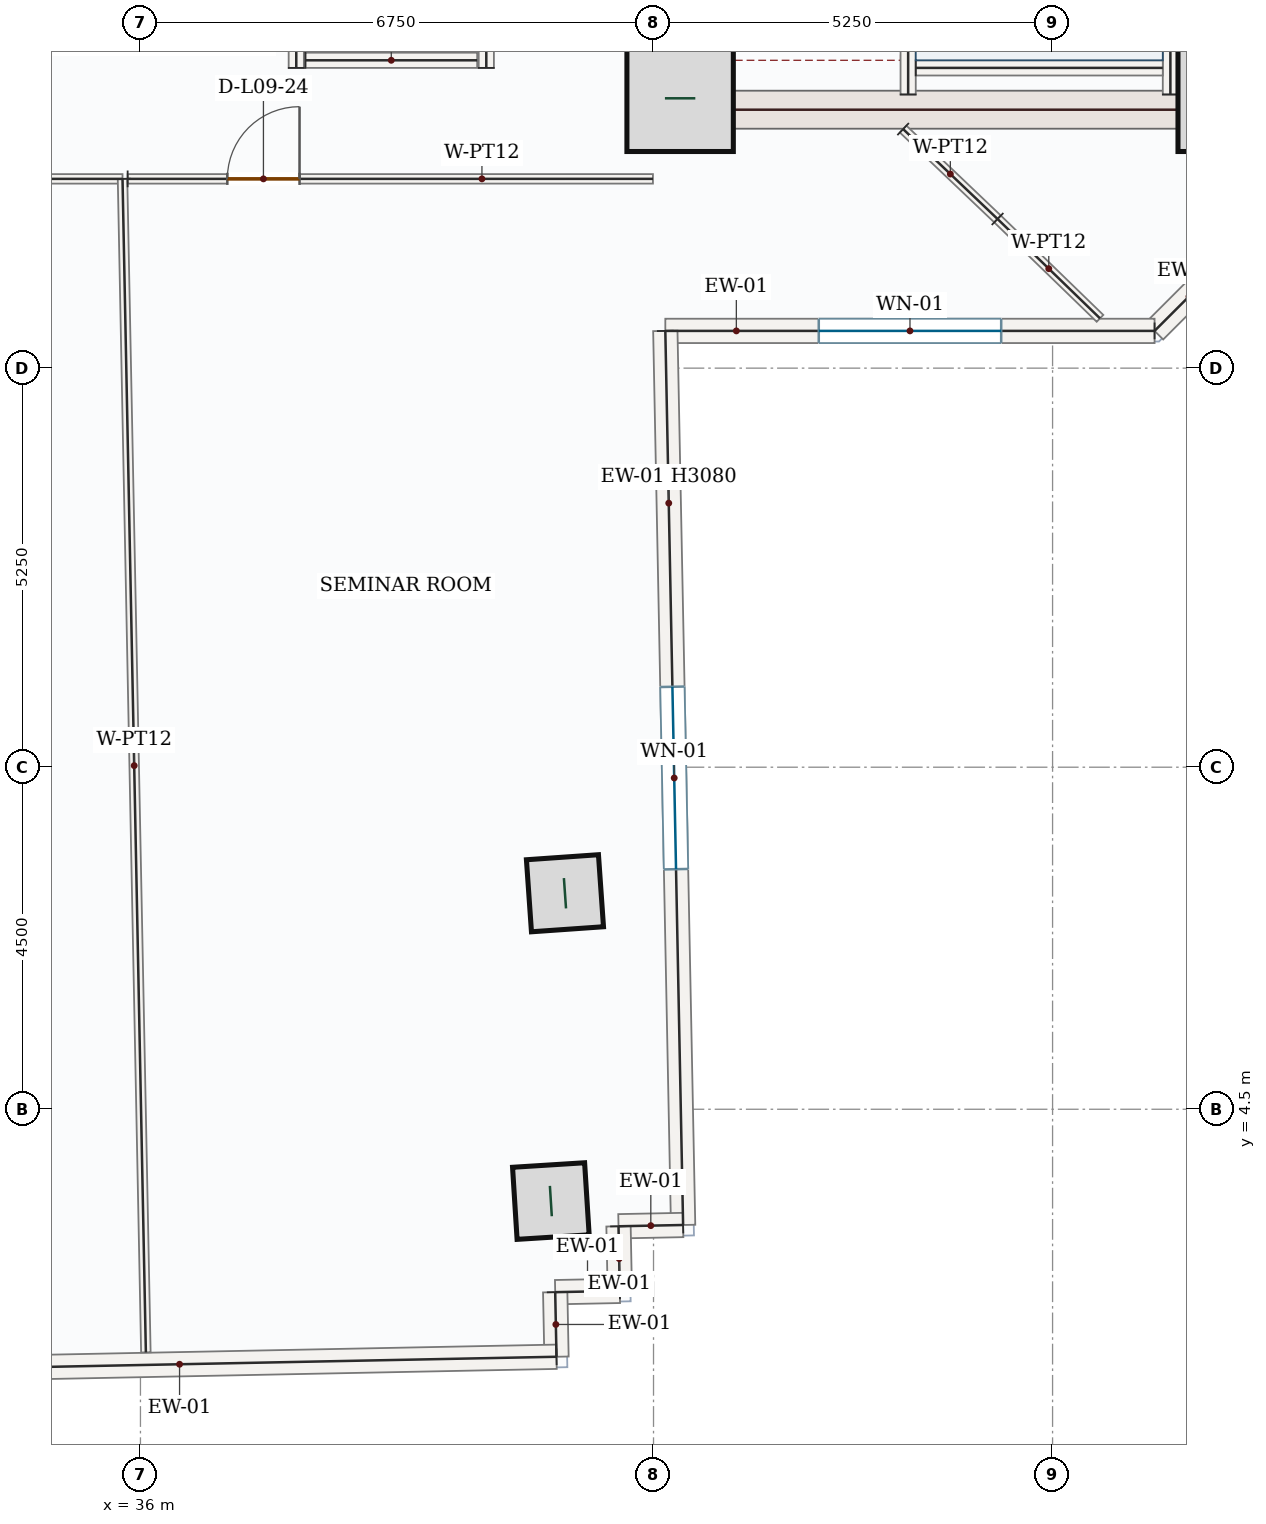
"""IFC4 building model, lengths in metres.
Left out: names, types, materials, properties, quantities, classifications, styles, units other than length and angle.
Written with IfcOpenShell. Run it as: python <this file> out.ifc"""

import sys

from ifc_helpers import new_model, si_unit, direction, frame, frame_2d, origin, origin_2d, place, context, subcontext, project, spatial, rectangle, hollow_rectangle, extrude, source, transform, mapped, element, fill, save


model = new_model("IFC4")
c1 = context("Model", 3, precision=1e-05, world=origin(), true_north=direction((0.0, 1.0)))
c2 = subcontext(c1, "Body", "Model", "MODEL_VIEW")
j1 = project(units=[si_unit("LENGTHUNIT", "METRE"), si_unit("PLANEANGLEUNIT", "RADIAN")], contexts=[c1])
p1 = place(None, origin())
s1 = spatial("IfcSite", under=j1, at=p1, CompositionType="ELEMENT")
p2 = place(p1, origin())
s2 = spatial("IfcBuilding", under=s1, at=p2, CompositionType="ELEMENT")
p3 = place(p2, frame((0.0, 0.0, 45.9)))
s3 = spatial("IfcBuildingStorey", under=s2, at=p3, CompositionType="ELEMENT", Elevation=45.9)
p4 = place(p3, frame((43.0, 17.4, 0.0), z_axis=(0.0, 0.0, 1.0), x_axis=(0.0, 1.0, 0.0)))
e1 = element("IfcWall", 1, at=p4, inside=s3, PredefinedType="SHEAR", context=c2, shape_type="SweptSolid", body=[
    extrude(rectangle(XDim=8.55, YDim=0.5, at=frame_2d((4.275, 0.0))), origin(), (0.0, 0.0, 1.0), 3.95),
])
p5 = place(p4, frame((6.65, 0.0, 0.0)))
e2 = element("IfcOpeningElement", 2, at=p5, cuts=e1, PredefinedType="OPENING", context=c2, shape_type="SweptSolid", body=[
    extrude(rectangle(XDim=1.1, YDim=2.2, at=frame_2d((0.55, 1.1))), frame((0.0, 0.26, 0.0), z_axis=(0.0, -1.0, 0.0), x_axis=(1.0, 0.0, 0.0)), (0.0, 0.0, 1.0), 0.52),
])
p6 = place(p4, frame((1.75, 0.0, 0.0)))
e3 = element("IfcOpeningElement", 3, at=p6, cuts=e1, PredefinedType="OPENING", context=c2, shape_type="SweptSolid", body=[
    extrude(rectangle(XDim=1.3, YDim=2.2, at=frame_2d((0.65, 1.1))), frame((0.0, 0.26, 0.0), z_axis=(0.0, -1.0, 0.0), x_axis=(1.0, 0.0, 0.0)), (0.0, 0.0, 1.0), 0.52),
])
p7 = place(p4, frame((4.55, 0.0, 0.0)))
e4 = element("IfcOpeningElement", 4, at=p7, cuts=e1, PredefinedType="OPENING", context=c2, shape_type="SweptSolid", body=[
    extrude(rectangle(XDim=0.88, YDim=2.1, at=frame_2d((0.44, 1.05))), frame((0.0, 0.26, 0.0), z_axis=(0.0, -1.0, 0.0), x_axis=(1.0, 0.0, 0.0)), (0.0, 0.0, 1.0), 0.52),
])
m1 = source(origin(), c2, "Body", "SweptSolid", [
    extrude(rectangle(XDim=7.0, YDim=0.5, at=frame_2d((3.5, 0.0))), origin(), (0.0, 0.0, 1.0), 3.95),
])
p8 = place(p3, frame((43.25, 17.65, 0.0), z_axis=(0.0, 0.0, 1.0), x_axis=(1.0, 0.0, 0.0)))
e5 = element("IfcWall", 5, at=p8, inside=s3, PredefinedType="SHEAR", context=c2, shape_type="MappedRepresentation", body=[
    mapped(m1, transform((0.0, 0.0, 0.0), x_axis=(1.0, 0.0, 0.0), y_axis=(0.0, 1.0, 0.0), z_axis=(0.0, 0.0, 1.0), scale=1.0)),
])
m2 = source(origin(), c2, "Body", "SweptSolid", [
    extrude(rectangle(XDim=1.4, YDim=1.4, at=origin_2d()), origin(), (0.0, 0.0, 1.0), 4.2),
])
for number, where, z_axis, x_axis in (
    (6, (43.1, 17.8, 0.0), (0.0, 0.0, 1.0), (1.0, 0.0, 0.0)),
    (7, (50.35, 17.8, 0.0), (0.0, 0.0, 1.0), (1.0, 0.0, 0.0)),
):
    element("IfcColumn", number, at=place(p3, frame(where, z_axis=z_axis, x_axis=x_axis)), inside=s3, PredefinedType="COLUMN", context=c2, shape_type="MappedRepresentation", body=[
        mapped(m2, transform((0.0, 0.0, 0.0), x_axis=(1.0, 0.0, 0.0), y_axis=(0.0, 1.0, 0.0), z_axis=(0.0, 0.0, 1.0), scale=1.0)),
    ])
m3 = source(origin(), c2, "Body", "SweptSolid", [
    extrude(hollow_rectangle(XDim=0.95, YDim=0.95, WallThickness=0.05, at=origin_2d()), origin(), (0.0, 0.0, 1.0), 4.2),
])
for number, where, z_axis, x_axis in (
    (8, (41.585, 7.342, 0.0), (0.0, 0.0, 1.0), (-0.07, 0.998, 0.0)),
    (9, (41.399, 3.292, 0.0), (0.0, 0.0, 1.0), (-0.063, 0.998, 0.0)),
):
    element("IfcColumn", number, at=place(p3, frame(where, z_axis=z_axis, x_axis=x_axis)), inside=s3, PredefinedType="COLUMN", context=c2, shape_type="MappedRepresentation", body=[
        mapped(m3, transform((0.0, 0.0, 0.0), x_axis=(1.0, 0.0, 0.0), y_axis=(0.0, 1.0, 0.0), z_axis=(0.0, 0.0, 1.0), scale=1.0)),
    ])
p9 = place(p3, frame((53.06, 18.458, 0.0), z_axis=(0.0, 0.0, 1.0), x_axis=(-0.707106781187, -0.707106781187, 0.0)))
e10 = element("IfcWall", 10, at=p9, inside=s3, PredefinedType="SOLIDWALL", context=c2, shape_type="SweptSolid", body=[
    extrude(rectangle(XDim=5.258, YDim=0.32, at=frame_2d((2.629, 0.0))), origin(), (0.0, 0.0, 1.0), 3.95),
])
p10 = place(p9, frame((1.429, 0.0, 0.85)))
e11 = element("IfcOpeningElement", 11, at=p10, cuts=e10, PredefinedType="OPENING", context=c2, shape_type="SweptSolid", body=[
    extrude(rectangle(XDim=2.4, YDim=1.8, at=frame_2d((1.2, 0.9))), frame((0.0, 0.17, 0.0), z_axis=(0.0, -1.0, 0.0), x_axis=(1.0, 0.0, 0.0)), (0.0, 0.0, 1.0), 0.34),
])
p11 = place(p3, frame((49.342, 14.74, 0.0), z_axis=(0.0, 0.0, 1.0), x_axis=(-1.0, 0.0, 0.0)))
e12 = element("IfcWall", 12, at=p11, inside=s3, PredefinedType="SOLIDWALL", context=c2, shape_type="SweptSolid", body=[
    extrude(rectangle(XDim=6.437, YDim=0.32, at=frame_2d((3.218, 0.0))), origin(), (0.0, 0.0, 1.0), 3.95),
])
p12 = place(p11, frame((2.018, 0.0, 0.85)))
e13 = element("IfcOpeningElement", 13, at=p12, cuts=e12, PredefinedType="OPENING", context=c2, shape_type="SweptSolid", body=[
    extrude(rectangle(XDim=2.4, YDim=1.8, at=frame_2d((1.2, 0.9))), frame((0.0, 0.17, 0.0), z_axis=(0.0, -1.0, 0.0), x_axis=(1.0, 0.0, 0.0)), (0.0, 0.0, 1.0), 0.34),
])
p13 = place(p3, frame((42.905, 14.74, 0.0), z_axis=(0.0, 0.0, 1.0), x_axis=(0.019900582882, -0.999801963791, 0.0)))
e14 = element("IfcWall", 14, at=p13, inside=s3, PredefinedType="SOLIDWALL", context=c2, shape_type="SweptSolid", body=[
    extrude(rectangle(XDim=11.765, YDim=0.32, at=frame_2d((5.883, 0.0))), origin(), (0.0, 0.0, 1.0), 3.08),
])
p14 = place(p13, frame((4.683, 0.0, 0.85)))
e15 = element("IfcOpeningElement", 15, at=p14, cuts=e14, PredefinedType="OPENING", context=c2, shape_type="SweptSolid", body=[
    extrude(rectangle(XDim=2.4, YDim=1.8, at=frame_2d((1.2, 0.9))), frame((0.0, 0.17, 0.0), z_axis=(0.0, -1.0, 0.0), x_axis=(1.0, 0.0, 0.0)), (0.0, 0.0, 1.0), 0.34),
])
m4 = source(origin(), c2, "Body", "SweptSolid", [
    extrude(rectangle(XDim=0.85, YDim=0.32, at=frame_2d((0.425, 0.0))), origin(), (0.0, 0.0, 1.0), 3.95),
])
for number, where, z_axis, x_axis in (
    (16, (43.139, 2.977, 0.0), (0.0, 0.0, 1.0), (-1.0, -0.02, 0.0)),
    (17, (42.29, 2.96, 0.0), (0.0, 0.0, 1.0), (0.02, -1.0, 0.0)),
    (18, (42.306, 2.111, 0.0), (0.0, 0.0, 1.0), (-1.0, -0.02, 0.0)),
):
    element("IfcWall", number, at=place(p3, frame(where, z_axis=z_axis, x_axis=x_axis)), inside=s3, PredefinedType="SOLIDWALL", context=c2, shape_type="MappedRepresentation", body=[
        mapped(m4, transform((0.0, 0.0, 0.0), x_axis=(1.0, 0.0, 0.0), y_axis=(0.0, 1.0, 0.0), z_axis=(0.0, 0.0, 1.0), scale=1.0)),
    ])
m5 = source(origin(), c2, "Body", "SweptSolid", [
    extrude(rectangle(XDim=0.85, YDim=0.32, at=frame_2d((0.425, 0.0))), origin(), (0.0, 0.0, 1.0), 3.95),
])
p15 = place(p3, frame((41.457, 2.094, 0.0), z_axis=(0.0, 0.0, 1.0), x_axis=(0.019823689915, -0.999803491351, 0.0)))
e19 = element("IfcWall", 19, at=p15, inside=s3, PredefinedType="SOLIDWALL", context=c2, shape_type="MappedRepresentation", body=[
    mapped(m5, transform((0.0, 0.0, 0.0), x_axis=(1.0, 0.0, 0.0), y_axis=(0.0, 1.0, 0.0), z_axis=(0.0, 0.0, 1.0), scale=1.0)),
])
m6 = source(origin(), c2, "Body", "SweptSolid", [
    extrude(rectangle(XDim=9.92, YDim=0.32, at=frame_2d((4.96, 0.0))), origin(), (0.0, 0.0, 1.0), 3.95),
])
p16 = place(p3, frame((41.473, 1.244, 0.0), z_axis=(0.0, 0.0, 1.0), x_axis=(-0.999801768563, -0.019910388705, 0.0)))
e20 = element("IfcWall", 20, at=p16, inside=s3, PredefinedType="SOLIDWALL", context=c2, shape_type="MappedRepresentation", body=[
    mapped(m6, transform((0.0, 0.0, 0.0), x_axis=(1.0, 0.0, 0.0), y_axis=(0.0, 1.0, 0.0), z_axis=(0.0, 0.0, 1.0), scale=1.0)),
])
m7 = source(origin(), c2, "Body", "SweptSolid", [
    extrude(rectangle(XDim=7.87, YDim=0.2, at=frame_2d((3.935, 0.0))), origin(), (0.0, 0.0, 1.0), 3.95),
])
p17 = place(p3, frame((49.55, 17.85, 0.0), z_axis=(0.0, 0.0, 1.0), x_axis=(0.0, 1.0, 0.0)))
e21 = element("IfcWall", 21, at=p17, inside=s3, PredefinedType="SOLIDWALL", context=c2, shape_type="MappedRepresentation", body=[
    mapped(m7, transform((0.0, 0.0, 0.0), x_axis=(1.0, 0.0, 0.0), y_axis=(0.0, 1.0, 0.0), z_axis=(0.0, 0.0, 1.0), scale=1.0)),
])
p18 = place(p3, frame((46.1, 17.85, 0.0), z_axis=(0.0, 0.0, 1.0), x_axis=(0.0, 1.0, 0.0)))
e22 = element("IfcWall", 22, at=p18, inside=s3, PredefinedType="SOLIDWALL", context=c2, shape_type="SweptSolid", body=[
    extrude(rectangle(XDim=8.0, YDim=0.2, at=frame_2d((4.0, 0.0))), origin(), (0.0, 0.0, 1.0), 3.95),
])
p19 = place(p18, frame((6.3, 0.0, 0.0)))
e23 = element("IfcOpeningElement", 23, at=p19, cuts=e22, PredefinedType="OPENING", context=c2, shape_type="SweptSolid", body=[
    extrude(rectangle(XDim=1.05, YDim=2.15, at=frame_2d((0.525, 1.075))), frame((0.0, 0.11, 0.0), z_axis=(0.0, -1.0, 0.0), x_axis=(1.0, 0.0, 0.0)), (0.0, 0.0, 1.0), 0.22),
])
m8 = source(origin(), c2, "Body", "SweptSolid", [
    extrude(rectangle(XDim=3.25, YDim=0.2, at=frame_2d((1.625, 0.0))), origin(), (0.0, 0.0, 1.0), 3.95),
])
p20 = place(p3, frame((46.2, 18.2, 0.0), z_axis=(0.0, 0.0, 1.0), x_axis=(1.0, 0.0, 0.0)))
e24 = element("IfcWall", 24, at=p20, inside=s3, PredefinedType="SOLIDWALL", context=c2, shape_type="MappedRepresentation", body=[
    mapped(m8, transform((0.0, 0.0, 0.0), x_axis=(1.0, 0.0, 0.0), y_axis=(0.0, 1.0, 0.0), z_axis=(0.0, 0.0, 1.0), scale=1.0)),
])
m9 = source(origin(), c2, "Body", "SweptSolid", [
    extrude(rectangle(XDim=2.35, YDim=0.2, at=frame_2d((1.175, 0.0))), origin(), (0.0, 0.0, 1.0), 3.95),
])
for number, where, z_axis, x_axis in (
    (25, (38.05, 18.2, 0.0), (0.0, 0.0, 1.0), (0.0, 1.0, 0.0)),
    (26, (40.55, 18.2, 0.0), (0.0, 0.0, 1.0), (0.0, 1.0, 0.0)),
):
    element("IfcWall", number, at=place(p3, frame(where, z_axis=z_axis, x_axis=x_axis)), inside=s3, PredefinedType="SOLIDWALL", context=c2, shape_type="MappedRepresentation", body=[
        mapped(m9, transform((0.0, 0.0, 0.0), x_axis=(1.0, 0.0, 0.0), y_axis=(0.0, 1.0, 0.0), z_axis=(0.0, 0.0, 1.0), scale=1.0)),
    ])
m10 = source(origin(), c2, "Body", "SweptSolid", [
    extrude(rectangle(XDim=2.26, YDim=0.2, at=frame_2d((1.13, 0.0))), origin(), (0.0, 0.0, 1.0), 3.95),
])
p21 = place(p3, frame((38.17, 18.3, 0.0), z_axis=(0.0, 0.0, 1.0), x_axis=(1.0, 0.0, 0.0)))
e27 = element("IfcWall", 27, at=p21, inside=s3, PredefinedType="SOLIDWALL", context=c2, shape_type="MappedRepresentation", body=[
    mapped(m10, transform((0.0, 0.0, 0.0), x_axis=(1.0, 0.0, 0.0), y_axis=(0.0, 1.0, 0.0), z_axis=(0.0, 0.0, 1.0), scale=1.0)),
])
p22 = place(p3, frame((29.258, 16.74, 0.0), z_axis=(0.0, 0.0, 1.0), x_axis=(0.999999999296, -3.7522044e-05, 0.0)))
e28 = element("IfcWall", 28, at=p22, inside=s3, PredefinedType="PARTITIONING", context=c2, shape_type="SweptSolid", body=[
    extrude(rectangle(XDim=6.507, YDim=0.125, at=frame_2d((3.253, 0.0))), origin(), (0.0, 0.0, 1.0), 3.95),
])
p23 = place(p22, frame((4.334, 0.0, 0.0)))
e29 = element("IfcOpeningElement", 29, at=p23, cuts=e28, PredefinedType="OPENING", context=c2, shape_type="SweptSolid", body=[
    extrude(rectangle(XDim=0.95, YDim=2.15, at=frame_2d((0.475, 1.075))), frame((0.0, 0.073, 0.0), z_axis=(0.0, -1.0, 0.0), x_axis=(1.0, 0.0, 0.0)), (0.0, 0.0, 1.0), 0.145),
])
m11 = source(origin(), c2, "Body", "SweptSolid", [
    extrude(rectangle(XDim=15.442, YDim=0.125, at=frame_2d((7.721, 0.0))), origin(), (0.0, 0.0, 1.0), 3.95),
])
p24 = place(p3, frame((35.764, 16.74, 0.0), z_axis=(0.0, 0.0, 1.0), x_axis=(0.01988979601, -0.999802178441, 0.0)))
e30 = element("IfcWall", 30, at=p24, inside=s3, PredefinedType="PARTITIONING", context=c2, shape_type="MappedRepresentation", body=[
    mapped(m11, transform((0.0, 0.0, 0.0), x_axis=(1.0, 0.0, 0.0), y_axis=(0.0, 1.0, 0.0), z_axis=(0.0, 0.0, 1.0), scale=1.0)),
])
p25 = place(p3, frame((35.832, 16.74, 0.0), z_axis=(0.0, 0.0, 1.0), x_axis=(0.999999999376, 3.5326951e-05, 0.0)))
e31 = element("IfcWall", 31, at=p25, inside=s3, PredefinedType="PARTITIONING", context=c2, shape_type="SweptSolid", body=[
    extrude(rectangle(XDim=6.911, YDim=0.125, at=frame_2d((3.456, 0.0))), origin(), (0.0, 0.0, 1.0), 3.95),
])
p26 = place(p25, frame((1.311, 0.0, 0.0)))
e32 = element("IfcOpeningElement", 32, at=p26, cuts=e31, PredefinedType="OPENING", context=c2, shape_type="SweptSolid", body=[
    extrude(rectangle(XDim=0.95, YDim=2.15, at=frame_2d((0.475, 1.075))), frame((0.0, 0.073, 0.0), z_axis=(0.0, -1.0, 0.0), x_axis=(1.0, 0.0, 0.0)), (0.0, 0.0, 1.0), 0.145),
])
m12 = source(origin(), c2, "Body", "SweptSolid", [
    extrude(rectangle(XDim=1.715, YDim=0.125, at=frame_2d((0.857, 0.0))), origin(), (0.0, 0.0, 1.0), 3.95),
])
p27 = place(p3, frame((46.034, 17.395, 0.0), z_axis=(0.0, 0.0, 1.0), x_axis=(0.724259786069, -0.689527201989, 0.0)))
e33 = element("IfcWall", 33, at=p27, inside=s3, PredefinedType="PARTITIONING", context=c2, shape_type="MappedRepresentation", body=[
    mapped(m12, transform((0.0, 0.0, 0.0), x_axis=(1.0, 0.0, 0.0), y_axis=(0.0, 1.0, 0.0), z_axis=(0.0, 0.0, 1.0), scale=1.0)),
])
m13 = source(origin(), c2, "Body", "SweptSolid", [
    extrude(rectangle(XDim=1.878, YDim=0.125, at=frame_2d((0.939, 0.0))), origin(), (0.0, 0.0, 1.0), 3.95),
])
p28 = place(p3, frame((47.276, 16.212, 0.0), z_axis=(0.0, 0.0, 1.0), x_axis=(0.717752688518, -0.696298124459, 0.0)))
e34 = element("IfcWall", 34, at=p28, inside=s3, PredefinedType="PARTITIONING", context=c2, shape_type="MappedRepresentation", body=[
    mapped(m13, transform((0.0, 0.0, 0.0), x_axis=(1.0, 0.0, 0.0), y_axis=(0.0, 1.0, 0.0), z_axis=(0.0, 0.0, 1.0), scale=1.0)),
])
m14 = source(origin(), c2, "Body", "SweptSolid", [
    extrude(rectangle(XDim=2.4, YDim=1.8, at=frame_2d((1.2, 0.9))), frame((0.0, 0.03, 0.0), z_axis=(0.0, -1.0, 0.0), x_axis=(1.0, 0.0, 0.0)), (0.0, 0.0, 1.0), 0.06),
])
p29 = place(p12, origin())
e35 = element("IfcWindow", 35, at=p29, inside=s3, PartitioningType="DOUBLE_PANEL_VERTICAL", PredefinedType="WINDOW", context=c2, shape_type="MappedRepresentation", body=[
    mapped(m14, transform((0.0, 0.0, 0.0), x_axis=(1.0, 0.0, 0.0), y_axis=(0.0, 1.0, 0.0), z_axis=(0.0, 0.0, 1.0), scale=1.0)),
])
fill(e13, e35)
p30 = place(p14, origin())
e36 = element("IfcWindow", 36, at=p30, inside=s3, PartitioningType="DOUBLE_PANEL_VERTICAL", PredefinedType="WINDOW", context=c2, shape_type="MappedRepresentation", body=[
    mapped(m14, transform((0.0, 0.0, 0.0), x_axis=(1.0, 0.0, 0.0), y_axis=(0.0, 1.0, 0.0), z_axis=(0.0, 0.0, 1.0), scale=1.0)),
])
fill(e15, e36)
m15 = source(origin(), c2, "Body", "SweptSolid", [
    extrude(rectangle(XDim=0.95, YDim=2.15, at=frame_2d((0.475, 1.075))), frame((0.0, 0.025, 0.0), z_axis=(0.0, -1.0, 0.0), x_axis=(1.0, 0.0, 0.0)), (0.0, 0.0, 1.0), 0.05),
])
p31 = place(p26, origin())
e37 = element("IfcDoor", 37, at=p31, inside=s3, OperationType="SINGLE_SWING_RIGHT", PredefinedType="DOOR", context=c2, shape_type="MappedRepresentation", body=[
    mapped(m15, transform((0.0, 0.0, 0.0), x_axis=(1.0, 0.0, 0.0), y_axis=(0.0, 1.0, 0.0), z_axis=(0.0, 0.0, 1.0), scale=1.0)),
])
fill(e32, e37)
save(model, sys.argv[1])
